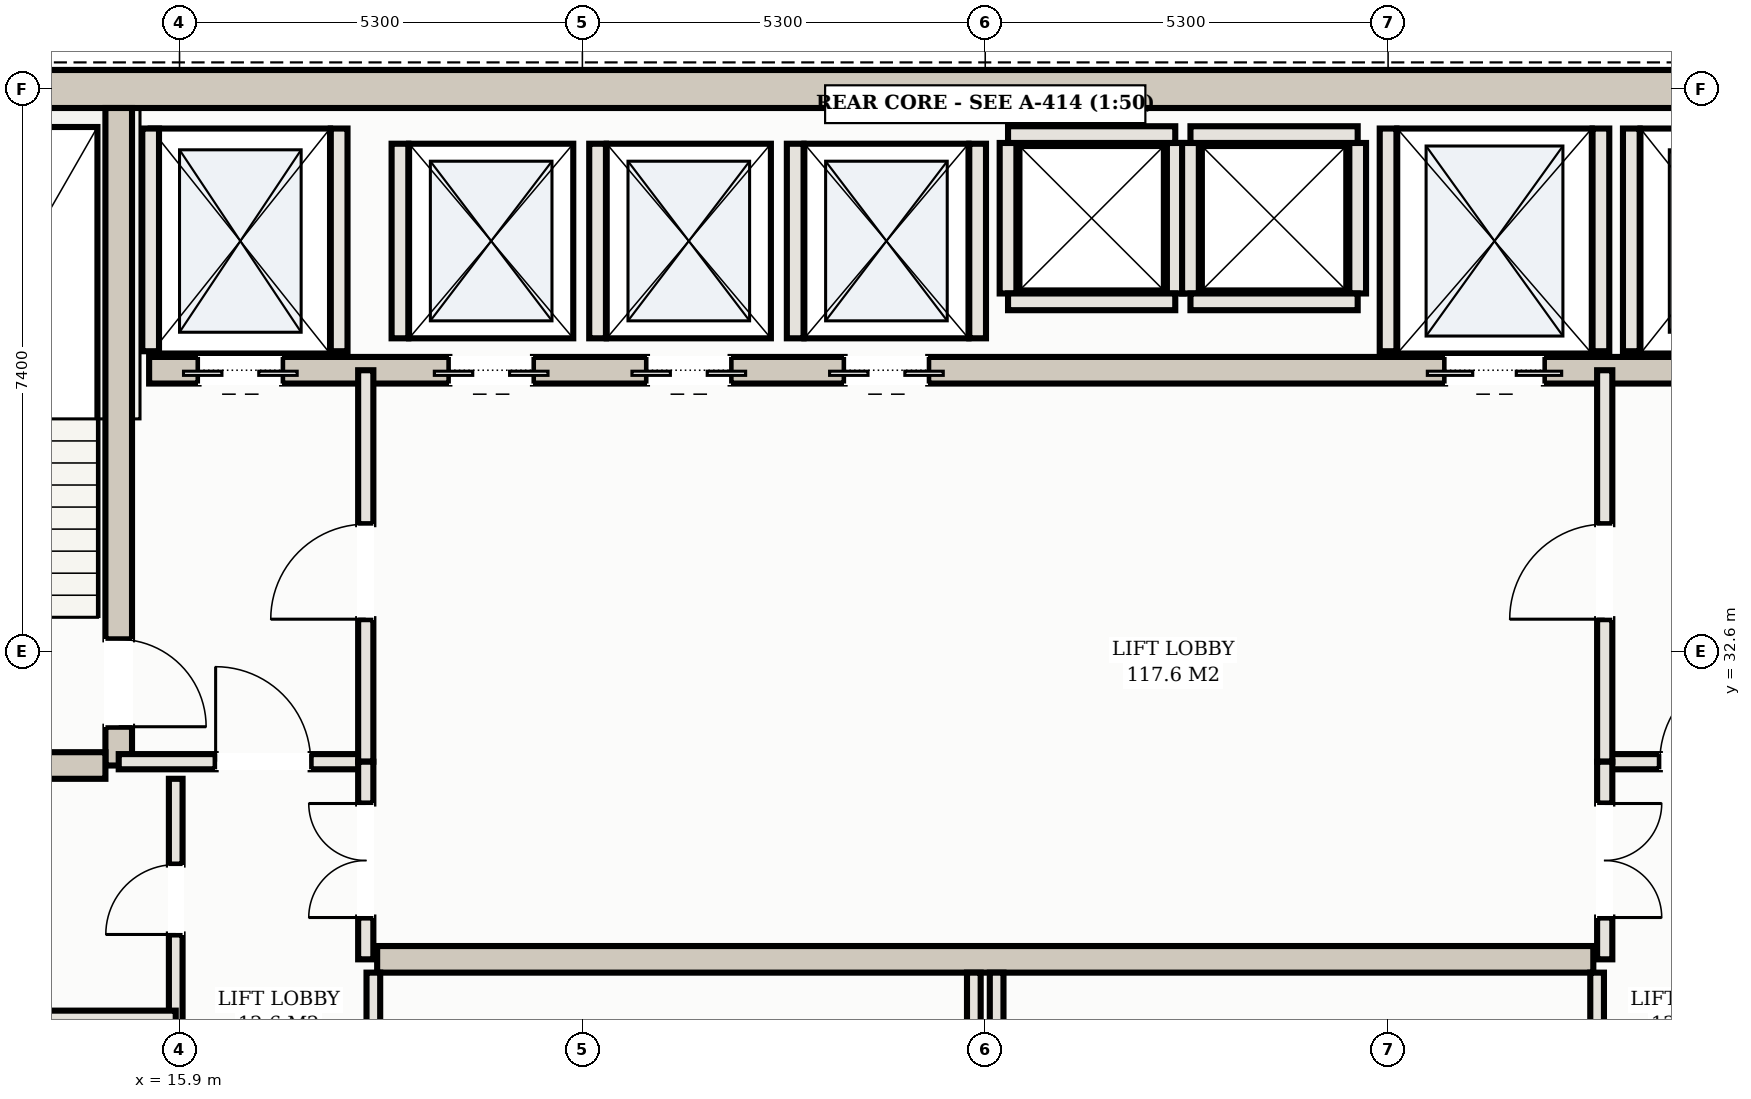
"""IFC4 building model, lengths in metres.
Left out: names, types, materials, properties, quantities, classifications, styles, units other than length and angle.
Written with IfcOpenShell. Run it as: python <this file> out.ifc"""

import sys

from ifc_helpers import new_model, si_unit, direction, frame, frame_2d, origin, place, context, subcontext, project, spatial, rectangle, extrude, element, fill, save


model = new_model("IFC4")
c1 = context("Model", 3, precision=1e-05, world=origin(), true_north=direction((0.0, 1.0)))
c2 = subcontext(c1, "Body", "Model", "MODEL_VIEW")
j1 = project(units=[si_unit("LENGTHUNIT", "METRE"), si_unit("PLANEANGLEUNIT", "RADIAN")], contexts=[c1])
p1 = place(None, origin())
s1 = spatial("IfcSite", under=j1, at=p1, CompositionType="ELEMENT")
p2 = place(p1, origin())
s2 = spatial("IfcBuilding", under=s1, at=p2, CompositionType="ELEMENT")
p3 = place(p2, frame((0.0, 0.0, 229.7)))
s3 = spatial("IfcBuildingStorey", under=s2, at=p3, CompositionType="ELEMENT", Elevation=229.7)
p4 = place(p3, frame((10.35, 40.0, 0.0), z_axis=(0.0, 0.0, 1.0), x_axis=(1.0, 0.0, 0.0)))
e1 = element("IfcWall", 1, at=p4, inside=s3, PredefinedType="SHEAR", context=c2, shape_type="SweptSolid", body=[
    extrude(rectangle(XDim=32.3, YDim=0.5, at=frame_2d((16.15, 0.0))), origin(), (0.0, 0.0, 1.0), 3.11),
])
p5 = place(p3, frame((15.1, 31.1, 0.0), z_axis=(0.0, 0.0, 1.0), x_axis=(0.0, 1.0, 0.0)))
e2 = element("IfcWall", 2, at=p5, inside=s3, PredefinedType="SHEAR", context=c2, shape_type="SweptSolid", body=[
    extrude(rectangle(XDim=8.65, YDim=0.35, at=frame_2d((4.325, 0.0))), origin(), (0.0, 0.0, 1.0), 3.11),
])
p6 = place(p5, frame((0.51, 0.0, 0.0)))
e3 = element("IfcOpeningElement", 3, at=p6, cuts=e2, PredefinedType="OPENING", context=c2, shape_type="SweptSolid", body=[
    extrude(rectangle(XDim=1.15, YDim=2.2, at=frame_2d((0.575, 1.1))), frame((0.0, 0.185, 0.0), z_axis=(0.0, -1.0, 0.0), x_axis=(1.0, 0.0, 0.0)), (0.0, 0.0, 1.0), 0.37),
])
p7 = place(p3, frame((10.85, 31.1, 0.0), z_axis=(0.0, 0.0, 1.0), x_axis=(1.0, 0.0, 0.0)))
e4 = element("IfcWall", 4, at=p7, inside=s3, PredefinedType="SHEAR", context=c2, shape_type="SweptSolid", body=[
    extrude(rectangle(XDim=4.075, YDim=0.35, at=frame_2d((2.038, 0.0))), origin(), (0.0, 0.0, 1.0), 3.11),
])
p8 = place(p3, frame((15.5, 36.3, 0.0), z_axis=(0.0, 0.0, 1.0), x_axis=(1.0, 0.0, 0.0)))
e5 = element("IfcWall", 5, at=p8, inside=s3, PredefinedType="SHEAR", context=c2, shape_type="SweptSolid", body=[
    extrude(rectangle(XDim=22.0, YDim=0.35, at=frame_2d((11.0, 0.0))), origin(), (0.0, 0.0, 1.0), 3.11),
])
p9 = place(p8, frame((0.65, 0.0, 0.0)))
e6 = element("IfcOpeningElement", 6, at=p9, cuts=e5, PredefinedType="OPENING", context=c2, shape_type="SweptSolid", body=[
    extrude(rectangle(XDim=1.1, YDim=2.15, at=frame_2d((0.55, 1.075))), frame((0.0, 0.185, 0.0), z_axis=(0.0, -1.0, 0.0), x_axis=(1.0, 0.0, 0.0)), (0.0, 0.0, 1.0), 0.37),
])
p10 = place(p8, frame((20.25, 0.0, 0.0)))
e7 = element("IfcOpeningElement", 7, at=p10, cuts=e5, PredefinedType="OPENING", context=c2, shape_type="SweptSolid", body=[
    extrude(rectangle(XDim=1.1, YDim=2.15, at=frame_2d((0.55, 1.075))), frame((0.0, 0.185, 0.0), z_axis=(0.0, -1.0, 0.0), x_axis=(1.0, 0.0, 0.0)), (0.0, 0.0, 1.0), 0.37),
])
p11 = place(p8, frame((17.05, 0.0, 0.0)))
e8 = element("IfcOpeningElement", 8, at=p11, cuts=e5, PredefinedType="OPENING", context=c2, shape_type="SweptSolid", body=[
    extrude(rectangle(XDim=1.3, YDim=2.2, at=frame_2d((0.65, 1.1))), frame((0.0, 0.185, 0.0), z_axis=(0.0, -1.0, 0.0), x_axis=(1.0, 0.0, 0.0)), (0.0, 0.0, 1.0), 0.37),
])
p12 = place(p8, frame((3.95, 0.0, 0.0)))
e9 = element("IfcOpeningElement", 9, at=p12, cuts=e5, PredefinedType="OPENING", context=c2, shape_type="SweptSolid", body=[
    extrude(rectangle(XDim=1.1, YDim=2.15, at=frame_2d((0.55, 1.075))), frame((0.0, 0.185, 0.0), z_axis=(0.0, -1.0, 0.0), x_axis=(1.0, 0.0, 0.0)), (0.0, 0.0, 1.0), 0.37),
])
p13 = place(p8, frame((6.55, 0.0, 0.0)))
e10 = element("IfcOpeningElement", 10, at=p13, cuts=e5, PredefinedType="OPENING", context=c2, shape_type="SweptSolid", body=[
    extrude(rectangle(XDim=1.1, YDim=2.15, at=frame_2d((0.55, 1.075))), frame((0.0, 0.185, 0.0), z_axis=(0.0, -1.0, 0.0), x_axis=(1.0, 0.0, 0.0)), (0.0, 0.0, 1.0), 0.37),
])
p14 = place(p8, frame((9.15, 0.0, 0.0)))
e11 = element("IfcOpeningElement", 11, at=p14, cuts=e5, PredefinedType="OPENING", context=c2, shape_type="SweptSolid", body=[
    extrude(rectangle(XDim=1.1, YDim=2.15, at=frame_2d((0.55, 1.075))), frame((0.0, 0.185, 0.0), z_axis=(0.0, -1.0, 0.0), x_axis=(1.0, 0.0, 0.0)), (0.0, 0.0, 1.0), 0.37),
])
p15 = place(p3, frame((18.5, 28.55, 0.0), z_axis=(0.0, 0.0, 1.0), x_axis=(1.0, 0.0, 0.0)))
e12 = element("IfcWall", 12, at=p15, inside=s3, PredefinedType="SHEAR", context=c2, shape_type="SweptSolid", body=[
    extrude(rectangle(XDim=16.0, YDim=0.35, at=frame_2d((8.0, 0.0))), origin(), (0.0, 0.0, 1.0), 3.11),
])
for number, where, z_axis, x_axis in (
    (13, (15.52, 36.55, 0.0), (0.0, 0.0, 1.0), (0.0, 1.0, 0.0)),
    (14, (18.0, 36.55, 0.0), (0.0, 0.0, 1.0), (0.0, 1.0, 0.0)),
    (15, (35.0, 36.55, 0.0), (0.0, 0.0, 1.0), (0.0, 1.0, 0.0)),
    (16, (31.8, 36.55, 0.0), (0.0, 0.0, 1.0), (0.0, 1.0, 0.0)),
    (17, (34.6, 36.55, 0.0), (0.0, 0.0, 1.0), (0.0, 1.0, 0.0)),
):
    element("IfcWall", number, at=place(p3, frame(where, z_axis=z_axis, x_axis=x_axis)), inside=s3, PredefinedType="SOLIDWALL", context=c2, shape_type="SweptSolid", body=[
        extrude(rectangle(XDim=2.93, YDim=0.22, at=frame_2d((1.465, 0.0))), origin(), (0.0, 0.0, 1.0), 3.11),
    ])
for number, where, z_axis, x_axis in (
    (18, (18.8, 36.72, 0.0), (0.0, 0.0, 1.0), (0.0, 1.0, 0.0)),
    (19, (21.4, 36.72, 0.0), (0.0, 0.0, 1.0), (0.0, 1.0, 0.0)),
    (20, (24.0, 36.72, 0.0), (0.0, 0.0, 1.0), (0.0, 1.0, 0.0)),
    (21, (26.4, 36.72, 0.0), (0.0, 0.0, 1.0), (0.0, 1.0, 0.0)),
):
    element("IfcWall", number, at=place(p3, frame(where, z_axis=z_axis, x_axis=x_axis)), inside=s3, PredefinedType="SOLIDWALL", context=c2, shape_type="SweptSolid", body=[
        extrude(rectangle(XDim=2.56, YDim=0.22, at=frame_2d((1.28, 0.0))), origin(), (0.0, 0.0, 1.0), 3.11),
    ])
for number, where, z_axis, x_axis in (
    (22, (26.8, 37.31, 0.0), (0.0, 0.0, 1.0), (0.0, 1.0, 0.0)),
    (23, (29.0, 37.31, 0.0), (0.0, 0.0, 1.0), (0.0, 1.0, 0.0)),
):
    element("IfcWall", number, at=place(p3, frame(where, z_axis=z_axis, x_axis=x_axis)), inside=s3, PredefinedType="SOLIDWALL", context=c2, shape_type="SweptSolid", body=[
        extrude(rectangle(XDim=1.98, YDim=0.22, at=frame_2d((0.99, 0.0))), origin(), (0.0, 0.0, 1.0), 3.11),
    ])
for number, where, z_axis, x_axis in (
    (24, (26.8, 39.4, 0.0), (0.0, 0.0, 1.0), (1.0, 0.0, 0.0)),
    (25, (26.8, 37.2, 0.0), (0.0, 0.0, 1.0), (1.0, 0.0, 0.0)),
):
    element("IfcWall", number, at=place(p3, frame(where, z_axis=z_axis, x_axis=x_axis)), inside=s3, PredefinedType="SOLIDWALL", context=c2, shape_type="SweptSolid", body=[
        extrude(rectangle(XDim=2.2, YDim=0.22, at=frame_2d((1.1, 0.0))), origin(), (0.0, 0.0, 1.0), 3.11),
    ])
for number, where, z_axis, x_axis in (
    (26, (29.2, 37.31, 0.0), (0.0, 0.0, 1.0), (0.0, 1.0, 0.0)),
    (27, (31.4, 37.31, 0.0), (0.0, 0.0, 1.0), (0.0, 1.0, 0.0)),
):
    element("IfcWall", number, at=place(p3, frame(where, z_axis=z_axis, x_axis=x_axis)), inside=s3, PredefinedType="SOLIDWALL", context=c2, shape_type="SweptSolid", body=[
        extrude(rectangle(XDim=1.98, YDim=0.22, at=frame_2d((0.99, 0.0))), origin(), (0.0, 0.0, 1.0), 3.11),
    ])
for number, where, z_axis, x_axis in (
    (28, (29.2, 39.4, 0.0), (0.0, 0.0, 1.0), (1.0, 0.0, 0.0)),
    (29, (29.2, 37.2, 0.0), (0.0, 0.0, 1.0), (1.0, 0.0, 0.0)),
):
    element("IfcWall", number, at=place(p3, frame(where, z_axis=z_axis, x_axis=x_axis)), inside=s3, PredefinedType="SOLIDWALL", context=c2, shape_type="SweptSolid", body=[
        extrude(rectangle(XDim=2.2, YDim=0.22, at=frame_2d((1.1, 0.0))), origin(), (0.0, 0.0, 1.0), 3.11),
    ])
p16 = place(p3, frame((15.1, 31.15, 0.0), z_axis=(0.0, 0.0, 1.0), x_axis=(1.0, 0.0, 0.0)))
e30 = element("IfcWall", 30, at=p16, inside=s3, PredefinedType="PARTITIONING", context=c2, shape_type="SweptSolid", body=[
    extrude(rectangle(XDim=3.25, YDim=0.2, at=frame_2d((1.625, 0.0))), origin(), (0.0, 0.0, 1.0), 2.43),
])
p17 = place(p16, frame((1.275, 0.0, 0.0)))
e31 = element("IfcOpeningElement", 31, at=p17, cuts=e30, PredefinedType="OPENING", context=c2, shape_type="SweptSolid", body=[
    extrude(rectangle(XDim=1.25, YDim=2.2, at=frame_2d((0.625, 1.1))), frame((0.0, 0.11, 0.0), z_axis=(0.0, -1.0, 0.0), x_axis=(1.0, 0.0, 0.0)), (0.0, 0.0, 1.0), 0.22),
])
p18 = place(p3, frame((18.35, 31.15, 0.0), z_axis=(0.0, 0.0, 1.0), x_axis=(0.0, 1.0, 0.0)))
e32 = element("IfcWall", 32, at=p18, inside=s3, PredefinedType="PARTITIONING", context=c2, shape_type="SweptSolid", body=[
    extrude(rectangle(XDim=5.15, YDim=0.2, at=frame_2d((2.575, 0.0))), origin(), (0.0, 0.0, 1.0), 2.43),
])
p19 = place(p18, frame((1.875, 0.0, 0.0)))
e33 = element("IfcOpeningElement", 33, at=p19, cuts=e32, PredefinedType="OPENING", context=c2, shape_type="SweptSolid", body=[
    extrude(rectangle(XDim=1.25, YDim=2.2, at=frame_2d((0.625, 1.1))), frame((0.0, 0.11, 0.0), z_axis=(0.0, -1.0, 0.0), x_axis=(1.0, 0.0, 0.0)), (0.0, 0.0, 1.0), 0.22),
])
p20 = place(p3, frame((34.65, 31.15, 0.0), z_axis=(0.0, 0.0, 1.0), x_axis=(1.0, 0.0, 0.0)))
e34 = element("IfcWall", 34, at=p20, inside=s3, PredefinedType="PARTITIONING", context=c2, shape_type="SweptSolid", body=[
    extrude(rectangle(XDim=3.25, YDim=0.2, at=frame_2d((1.625, 0.0))), origin(), (0.0, 0.0, 1.0), 2.43),
])
p21 = place(p20, frame((0.725, 0.0, 0.0)))
e35 = element("IfcOpeningElement", 35, at=p21, cuts=e34, PredefinedType="OPENING", context=c2, shape_type="SweptSolid", body=[
    extrude(rectangle(XDim=1.25, YDim=2.2, at=frame_2d((0.625, 1.1))), frame((0.0, 0.11, 0.0), z_axis=(0.0, -1.0, 0.0), x_axis=(1.0, 0.0, 0.0)), (0.0, 0.0, 1.0), 0.22),
])
p22 = place(p3, frame((34.65, 31.15, 0.0), z_axis=(0.0, 0.0, 1.0), x_axis=(0.0, 1.0, 0.0)))
e36 = element("IfcWall", 36, at=p22, inside=s3, PredefinedType="PARTITIONING", context=c2, shape_type="SweptSolid", body=[
    extrude(rectangle(XDim=5.15, YDim=0.2, at=frame_2d((2.575, 0.0))), origin(), (0.0, 0.0, 1.0), 2.43),
])
p23 = place(p22, frame((1.875, 0.0, 0.0)))
e37 = element("IfcOpeningElement", 37, at=p23, cuts=e36, PredefinedType="OPENING", context=c2, shape_type="SweptSolid", body=[
    extrude(rectangle(XDim=1.25, YDim=2.2, at=frame_2d((0.625, 1.1))), frame((0.0, 0.11, 0.0), z_axis=(0.0, -1.0, 0.0), x_axis=(1.0, 0.0, 0.0)), (0.0, 0.0, 1.0), 0.22),
])
p24 = place(p3, frame((15.85, 25.45, 0.0), z_axis=(0.0, 0.0, 1.0), x_axis=(0.0, 1.0, 0.0)))
e38 = element("IfcWall", 38, at=p24, inside=s3, PredefinedType="PARTITIONING", context=c2, shape_type="SweptSolid", body=[
    extrude(rectangle(XDim=5.475, YDim=0.18, at=frame_2d((2.738, 0.0))), origin(), (0.0, 0.0, 1.0), 2.43),
])
p25 = place(p24, frame((0.75, 0.0, 0.0)))
e39 = element("IfcOpeningElement", 39, at=p25, cuts=e38, PredefinedType="OPENING", context=c2, shape_type="SweptSolid", body=[
    extrude(rectangle(XDim=0.9, YDim=2.15, at=frame_2d((0.45, 1.075))), frame((0.0, 0.1, 0.0), z_axis=(0.0, -1.0, 0.0), x_axis=(1.0, 0.0, 0.0)), (0.0, 0.0, 1.0), 0.2),
])
p26 = place(p24, frame((3.427, 0.0, 0.0)))
e40 = element("IfcOpeningElement", 40, at=p26, cuts=e38, PredefinedType="OPENING", context=c2, shape_type="SweptSolid", body=[
    extrude(rectangle(XDim=0.92, YDim=2.15, at=frame_2d((0.46, 1.075))), frame((0.0, 0.1, 0.0), z_axis=(0.0, -1.0, 0.0), x_axis=(1.0, 0.0, 0.0)), (0.0, 0.0, 1.0), 0.2),
])
p27 = place(p3, frame((10.85, 27.8, 0.0), z_axis=(0.0, 0.0, 1.0), x_axis=(1.0, 0.0, 0.0)))
e41 = element("IfcWall", 41, at=p27, inside=s3, PredefinedType="PARTITIONING", context=c2, shape_type="SweptSolid", body=[
    extrude(rectangle(XDim=5.0, YDim=0.15, at=frame_2d((2.5, 0.0))), origin(), (0.0, 0.0, 1.0), 2.43),
])
p28 = place(p3, frame((18.35, 28.55, 0.0), z_axis=(0.0, 0.0, 1.0), x_axis=(0.0, 1.0, 0.0)))
e42 = element("IfcWall", 42, at=p28, inside=s3, PredefinedType="PARTITIONING", context=c2, shape_type="SweptSolid", body=[
    extrude(rectangle(XDim=2.6, YDim=0.2, at=frame_2d((1.3, 0.0))), origin(), (0.0, 0.0, 1.0), 2.43),
])
p29 = place(p28, frame((0.55, 0.0, 0.0)))
e43 = element("IfcOpeningElement", 43, at=p29, cuts=e42, PredefinedType="OPENING", context=c2, shape_type="SweptSolid", body=[
    extrude(rectangle(XDim=1.5, YDim=2.25, at=frame_2d((0.75, 1.125))), frame((0.0, 0.11, 0.0), z_axis=(0.0, -1.0, 0.0), x_axis=(1.0, 0.0, 0.0)), (0.0, 0.0, 1.0), 0.22),
])
p30 = place(p3, frame((34.65, 28.55, 0.0), z_axis=(0.0, 0.0, 1.0), x_axis=(0.0, 1.0, 0.0)))
e44 = element("IfcWall", 44, at=p30, inside=s3, PredefinedType="PARTITIONING", context=c2, shape_type="SweptSolid", body=[
    extrude(rectangle(XDim=2.6, YDim=0.2, at=frame_2d((1.3, 0.0))), origin(), (0.0, 0.0, 1.0), 2.43),
])
p31 = place(p30, frame((0.55, 0.0, 0.0)))
e45 = element("IfcOpeningElement", 45, at=p31, cuts=e44, PredefinedType="OPENING", context=c2, shape_type="SweptSolid", body=[
    extrude(rectangle(XDim=1.5, YDim=2.25, at=frame_2d((0.75, 1.125))), frame((0.0, 0.11, 0.0), z_axis=(0.0, -1.0, 0.0), x_axis=(1.0, 0.0, 0.0)), (0.0, 0.0, 1.0), 0.22),
])
for number, where, z_axis, x_axis in (
    (46, (18.45, 25.62, 0.0), (0.0, 0.0, 1.0), (0.0, 1.0, 0.0)),
    (47, (26.35, 25.62, 0.0), (0.0, 0.0, 1.0), (0.0, 1.0, 0.0)),
    (48, (26.65, 25.62, 0.0), (0.0, 0.0, 1.0), (0.0, 1.0, 0.0)),
    (49, (34.55, 25.62, 0.0), (0.0, 0.0, 1.0), (0.0, 1.0, 0.0)),
):
    element("IfcWall", number, at=place(p3, frame(where, z_axis=z_axis, x_axis=x_axis)), inside=s3, PredefinedType="PARTITIONING", context=c2, shape_type="SweptSolid", body=[
        extrude(rectangle(XDim=2.755, YDim=0.18, at=frame_2d((1.377, 0.0))), origin(), (0.0, 0.0, 1.0), 2.43),
    ])
p32 = place(p9, frame((1.1, 0.0, 0.0), z_axis=(0.0, 0.0, 1.0), x_axis=(-1.0, 0.0, 0.0)))
e50 = element("IfcDoor", 50, at=p32, inside=s3, OperationType="DOUBLE_DOOR_SLIDING", PredefinedType="DOOR", context=c2, shape_type="SweptSolid", body=[
    extrude(rectangle(XDim=1.1, YDim=2.15, at=frame_2d((0.55, 1.075))), frame((0.0, 0.025, 0.0), z_axis=(0.0, -1.0, 0.0), x_axis=(1.0, 0.0, 0.0)), (0.0, 0.0, 1.0), 0.05),
])
fill(e6, e50)
p33 = place(p11, frame((1.3, 0.0, 0.0), z_axis=(0.0, 0.0, 1.0), x_axis=(-1.0, 0.0, 0.0)))
e51 = element("IfcDoor", 51, at=p33, inside=s3, OperationType="DOUBLE_DOOR_SLIDING", PredefinedType="DOOR", context=c2, shape_type="SweptSolid", body=[
    extrude(rectangle(XDim=1.3, YDim=2.2, at=frame_2d((0.65, 1.1))), frame((0.0, 0.025, 0.0), z_axis=(0.0, -1.0, 0.0), x_axis=(1.0, 0.0, 0.0)), (0.0, 0.0, 1.0), 0.05),
])
fill(e8, e51)
p34 = place(p12, frame((1.1, 0.0, 0.0), z_axis=(0.0, 0.0, 1.0), x_axis=(-1.0, 0.0, 0.0)))
e52 = element("IfcDoor", 52, at=p34, inside=s3, OperationType="DOUBLE_DOOR_SLIDING", PredefinedType="DOOR", context=c2, shape_type="SweptSolid", body=[
    extrude(rectangle(XDim=1.1, YDim=2.15, at=frame_2d((0.55, 1.075))), frame((0.0, 0.025, 0.0), z_axis=(0.0, -1.0, 0.0), x_axis=(1.0, 0.0, 0.0)), (0.0, 0.0, 1.0), 0.05),
])
fill(e9, e52)
p35 = place(p13, frame((1.1, 0.0, 0.0), z_axis=(0.0, 0.0, 1.0), x_axis=(-1.0, 0.0, 0.0)))
e53 = element("IfcDoor", 53, at=p35, inside=s3, OperationType="DOUBLE_DOOR_SLIDING", PredefinedType="DOOR", context=c2, shape_type="SweptSolid", body=[
    extrude(rectangle(XDim=1.1, YDim=2.15, at=frame_2d((0.55, 1.075))), frame((0.0, 0.025, 0.0), z_axis=(0.0, -1.0, 0.0), x_axis=(1.0, 0.0, 0.0)), (0.0, 0.0, 1.0), 0.05),
])
fill(e10, e53)
p36 = place(p14, frame((1.1, 0.0, 0.0), z_axis=(0.0, 0.0, 1.0), x_axis=(-1.0, 0.0, 0.0)))
e54 = element("IfcDoor", 54, at=p36, inside=s3, OperationType="DOUBLE_DOOR_SLIDING", PredefinedType="DOOR", context=c2, shape_type="SweptSolid", body=[
    extrude(rectangle(XDim=1.1, YDim=2.15, at=frame_2d((0.55, 1.075))), frame((0.0, 0.025, 0.0), z_axis=(0.0, -1.0, 0.0), x_axis=(1.0, 0.0, 0.0)), (0.0, 0.0, 1.0), 0.05),
])
fill(e11, e54)
p37 = place(p17, origin())
e55 = element("IfcDoor", 55, at=p37, inside=s3, OperationType="SINGLE_SWING_LEFT", PredefinedType="DOOR", context=c2, shape_type="SweptSolid", body=[
    extrude(rectangle(XDim=1.25, YDim=2.2, at=frame_2d((0.625, 1.1))), frame((0.0, 0.025, 0.0), z_axis=(0.0, -1.0, 0.0), x_axis=(1.0, 0.0, 0.0)), (0.0, 0.0, 1.0), 0.05),
])
fill(e31, e55)
p38 = place(p19, origin())
e56 = element("IfcDoor", 56, at=p38, inside=s3, OperationType="SINGLE_SWING_LEFT", PredefinedType="DOOR", context=c2, shape_type="SweptSolid", body=[
    extrude(rectangle(XDim=1.25, YDim=2.2, at=frame_2d((0.625, 1.1))), frame((0.0, 0.025, 0.0), z_axis=(0.0, -1.0, 0.0), x_axis=(1.0, 0.0, 0.0)), (0.0, 0.0, 1.0), 0.05),
])
fill(e33, e56)
p39 = place(p21, origin())
e57 = element("IfcDoor", 57, at=p39, inside=s3, OperationType="SINGLE_SWING_RIGHT", PredefinedType="DOOR", context=c2, shape_type="SweptSolid", body=[
    extrude(rectangle(XDim=1.25, YDim=2.2, at=frame_2d((0.625, 1.1))), frame((0.0, 0.025, 0.0), z_axis=(0.0, -1.0, 0.0), x_axis=(1.0, 0.0, 0.0)), (0.0, 0.0, 1.0), 0.05),
])
fill(e35, e57)
p40 = place(p23, origin())
e58 = element("IfcDoor", 58, at=p40, inside=s3, OperationType="SINGLE_SWING_LEFT", PredefinedType="DOOR", context=c2, shape_type="SweptSolid", body=[
    extrude(rectangle(XDim=1.25, YDim=2.2, at=frame_2d((0.625, 1.1))), frame((0.0, 0.025, 0.0), z_axis=(0.0, -1.0, 0.0), x_axis=(1.0, 0.0, 0.0)), (0.0, 0.0, 1.0), 0.05),
])
fill(e37, e58)
p41 = place(p6, frame((1.15, 0.0, 0.0), z_axis=(0.0, 0.0, 1.0), x_axis=(-1.0, 0.0, 0.0)))
e59 = element("IfcDoor", 59, at=p41, inside=s3, OperationType="SINGLE_SWING_RIGHT", PredefinedType="DOOR", context=c2, shape_type="SweptSolid", body=[
    extrude(rectangle(XDim=1.15, YDim=2.2, at=frame_2d((0.575, 1.1))), frame((0.0, 0.025, 0.0), z_axis=(0.0, -1.0, 0.0), x_axis=(1.0, 0.0, 0.0)), (0.0, 0.0, 1.0), 0.05),
])
fill(e3, e59)
p42 = place(p26, origin())
e60 = element("IfcDoor", 60, at=p42, inside=s3, OperationType="SINGLE_SWING_LEFT", PredefinedType="DOOR", context=c2, shape_type="SweptSolid", body=[
    extrude(rectangle(XDim=0.92, YDim=2.15, at=frame_2d((0.46, 1.075))), frame((0.0, 0.025, 0.0), z_axis=(0.0, -1.0, 0.0), x_axis=(1.0, 0.0, 0.0)), (0.0, 0.0, 1.0), 0.05),
])
fill(e40, e60)
p43 = place(p29, origin())
e61 = element("IfcDoor", 61, at=p43, inside=s3, OperationType="DOUBLE_DOOR_SINGLE_SWING", PredefinedType="DOOR", context=c2, shape_type="SweptSolid", body=[
    extrude(rectangle(XDim=1.5, YDim=2.25, at=frame_2d((0.75, 1.125))), frame((0.0, 0.025, 0.0), z_axis=(0.0, -1.0, 0.0), x_axis=(1.0, 0.0, 0.0)), (0.0, 0.0, 1.0), 0.05),
])
fill(e43, e61)
p44 = place(p31, frame((1.5, 0.0, 0.0), z_axis=(0.0, 0.0, 1.0), x_axis=(-1.0, 0.0, 0.0)))
e62 = element("IfcDoor", 62, at=p44, inside=s3, OperationType="DOUBLE_DOOR_SINGLE_SWING", PredefinedType="DOOR", context=c2, shape_type="SweptSolid", body=[
    extrude(rectangle(XDim=1.5, YDim=2.25, at=frame_2d((0.75, 1.125))), frame((0.0, 0.025, 0.0), z_axis=(0.0, -1.0, 0.0), x_axis=(1.0, 0.0, 0.0)), (0.0, 0.0, 1.0), 0.05),
])
fill(e45, e62)
save(model, sys.argv[1])
